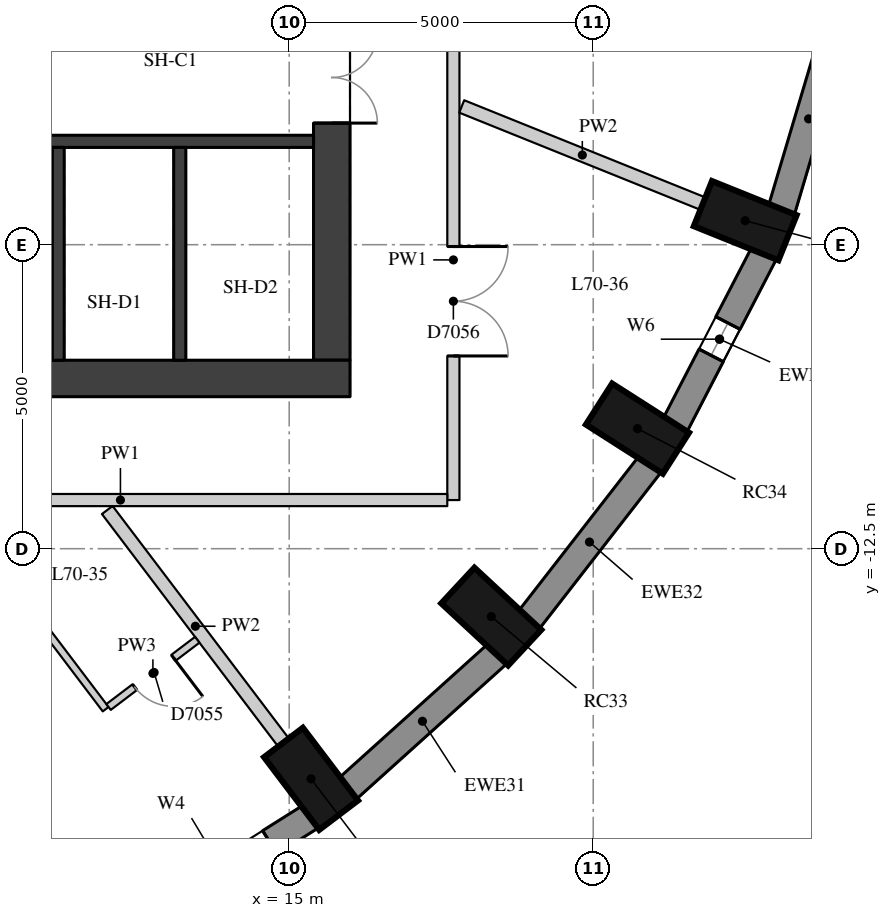
"""IFC4 building model, lengths in metres.
Left out: names, types, materials, properties, quantities, classifications, styles, units other than length and angle.
Written with IfcOpenShell. Run it as: python <this file> out.ifc"""

import sys

from ifc_helpers import new_model, si_unit, direction, frame, frame_2d, origin, origin_2d, place, context, subcontext, project, spatial, rectangle, extrude, element, fill, save


model = new_model("IFC4")
c1 = context("Model", 3, precision=1e-05, world=origin(), true_north=direction((0.0, 1.0)))
c2 = subcontext(c1, "Body", "Model", "MODEL_VIEW")
j1 = project(units=[si_unit("LENGTHUNIT", "METRE"), si_unit("PLANEANGLEUNIT", "RADIAN")], contexts=[c1])
p1 = place(None, origin())
s1 = spatial("IfcSite", under=j1, at=p1, CompositionType="ELEMENT")
p2 = place(p1, origin())
s2 = spatial("IfcBuilding", under=s1, at=p2, CompositionType="ELEMENT")
p3 = place(p2, frame((0.0, 0.0, 246.5)))
s3 = spatial("IfcBuildingStorey", under=s2, at=p3, CompositionType="ELEMENT", Elevation=246.5)
for number, where, z_axis, x_axis in (
    (1, (15.359, -16.285, 0.0), (0.0, 0.0, 1.0), (0.604, -0.797, 0.0)),
    (2, (18.323, -13.616, 0.0), (0.0, 0.0, 1.0), (0.733, -0.681, 0.0)),
    (3, (20.728, -10.525, 0.0), (0.0, 0.0, 1.0), (0.843, -0.539, 0.0)),
    (4, (22.5, -7.105, 0.0), (0.0, 0.0, 1.0), (0.928, -0.374, 0.0)),
):
    element("IfcColumn", number, at=place(p3, frame(where, z_axis=z_axis, x_axis=x_axis)), inside=s3, PredefinedType="COLUMN", context=c2, shape_type="SweptSolid", body=[
        extrude(rectangle(XDim=1.5, YDim=0.8, at=origin_2d()), origin(), (0.0, 0.0, 1.0), 3.3),
    ])
p4 = place(p3, frame((12.49, -18.711, 0.0), z_axis=(0.0, 0.0, 1.0), x_axis=(0.845929139811, 0.53329531258, 0.0)))
e5 = element("IfcWall", 5, at=p4, inside=s3, PredefinedType="SOLIDWALL", context=c2, shape_type="SweptSolid", body=[
    extrude(rectangle(XDim=3.385, YDim=0.45, at=frame_2d((1.692, 0.0))), origin(), (0.0, 0.0, 1.0), 3.02),
])
p5 = place(p4, frame((0.792, 0.0, 0.4)))
e6 = element("IfcOpeningElement", 6, at=p5, cuts=e5, PredefinedType="OPENING", context=c2, shape_type="SweptSolid", body=[
    extrude(rectangle(XDim=1.8, YDim=1.75, at=frame_2d((0.9, 0.875))), frame((0.0, 0.235, 0.0), z_axis=(0.0, -1.0, 0.0), x_axis=(1.0, 0.0, 0.0)), (0.0, 0.0, 1.0), 0.47),
])
p6 = place(p3, frame((15.959, -16.448, 0.0), z_axis=(0.0, 0.0, 1.0), x_axis=(0.743166014219, 0.669107073128, 0.0)))
e7 = element("IfcWall", 7, at=p6, inside=s3, PredefinedType="SOLIDWALL", context=c2, shape_type="SweptSolid", body=[
    extrude(rectangle(XDim=3.316, YDim=0.45, at=frame_2d((1.658, 0.0))), origin(), (0.0, 0.0, 1.0), 3.02),
])
p7 = place(p3, frame((18.942, -13.672, 0.0), z_axis=(0.0, 0.0, 1.0), x_axis=(0.613898970825, 0.789384604372, 0.0)))
e8 = element("IfcWall", 8, at=p7, inside=s3, PredefinedType="SOLIDWALL", context=c2, shape_type="SweptSolid", body=[
    extrude(rectangle(XDim=3.247, YDim=0.45, at=frame_2d((1.624, 0.0))), origin(), (0.0, 0.0, 1.0), 3.02),
])
p8 = place(p3, frame((21.345, -10.468, 0.0), z_axis=(0.0, 0.0, 1.0), x_axis=(0.459921155255, 0.887959757505, 0.0)))
e9 = element("IfcWall", 9, at=p8, inside=s3, PredefinedType="SOLIDWALL", context=c2, shape_type="SweptSolid", body=[
    extrude(rectangle(XDim=3.186, YDim=0.45, at=frame_2d((1.593, 0.0))), origin(), (0.0, 0.0, 1.0), 3.02),
])
p9 = place(p8, frame((1.293, 0.0, 0.4)))
e10 = element("IfcOpeningElement", 10, at=p9, cuts=e9, PredefinedType="OPENING", context=c2, shape_type="SweptSolid", body=[
    extrude(rectangle(XDim=0.6, YDim=1.75, at=frame_2d((0.3, 0.875))), frame((0.0, 0.235, 0.0), z_axis=(0.0, -1.0, 0.0), x_axis=(1.0, 0.0, 0.0)), (0.0, 0.0, 1.0), 0.47),
])
p10 = place(p3, frame((23.094, -6.935, 0.0), z_axis=(0.0, 0.0, 1.0), x_axis=(0.285263800865, 0.958449040855, 0.0)))
e11 = element("IfcWall", 11, at=p10, inside=s3, PredefinedType="SOLIDWALL", context=c2, shape_type="SweptSolid", body=[
    extrude(rectangle(XDim=3.139, YDim=0.45, at=frame_2d((1.57, 0.0))), origin(), (0.0, 0.0, 1.0), 3.02),
])
p11 = place(p3, frame((15.7, -9.4, 0.0), z_axis=(0.0, 0.0, 1.0), x_axis=(0.0, 1.0, 0.0)))
e12 = element("IfcWall", 12, at=p11, inside=s3, PredefinedType="SHEAR", context=c2, shape_type="SweptSolid", body=[
    extrude(rectangle(XDim=18.8, YDim=0.6, at=frame_2d((9.4, 0.0))), origin(), (0.0, 0.0, 1.0), 3.02),
])
p12 = place(p11, frame((13.4, 0.0, 0.0)))
e13 = element("IfcOpeningElement", 13, at=p12, cuts=e12, PredefinedType="OPENING", context=c2, shape_type="SweptSolid", body=[
    extrude(rectangle(XDim=1.5, YDim=2.1, at=frame_2d((0.75, 1.05))), frame((0.0, 0.31, 0.0), z_axis=(0.0, -1.0, 0.0), x_axis=(1.0, 0.0, 0.0)), (0.0, 0.0, 1.0), 0.62),
])
p13 = place(p11, frame((3.9, 0.0, 0.0)))
e14 = element("IfcOpeningElement", 14, at=p13, cuts=e12, PredefinedType="OPENING", context=c2, shape_type="SweptSolid", body=[
    extrude(rectangle(XDim=1.5, YDim=2.1, at=frame_2d((0.75, 1.05))), frame((0.0, 0.31, 0.0), z_axis=(0.0, -1.0, 0.0), x_axis=(1.0, 0.0, 0.0)), (0.0, 0.0, 1.0), 0.62),
])
p14 = place(p3, frame((4.0, -9.7, 0.0), z_axis=(0.0, 0.0, 1.0), x_axis=(1.0, 0.0, 0.0)))
e15 = element("IfcWall", 15, at=p14, inside=s3, PredefinedType="SHEAR", context=c2, shape_type="SweptSolid", body=[
    extrude(rectangle(XDim=12.0, YDim=0.6, at=frame_2d((6.0, 0.0))), origin(), (0.0, 0.0, 1.0), 3.02),
])
p15 = place(p3, frame((4.6, -5.8, 0.0), z_axis=(0.0, 0.0, 1.0), x_axis=(1.0, 0.0, 0.0)))
e16 = element("IfcWall", 16, at=p15, inside=s3, PredefinedType="SHEAR", context=c2, shape_type="SweptSolid", body=[
    extrude(rectangle(XDim=10.8, YDim=0.2, at=frame_2d((5.4, 0.0))), origin(), (0.0, 0.0, 1.0), 3.02),
])
for number, where, z_axis, x_axis in (
    (17, (11.2, -9.4, 0.0), (0.0, 0.0, 1.0), (0.0, 1.0, 0.0)),
    (18, (13.2, -9.4, 0.0), (0.0, 0.0, 1.0), (0.0, 1.0, 0.0)),
):
    element("IfcWall", number, at=place(p3, frame(where, z_axis=z_axis, x_axis=x_axis)), inside=s3, PredefinedType="SHEAR", context=c2, shape_type="SweptSolid", body=[
        extrude(rectangle(XDim=3.5, YDim=0.2, at=frame_2d((1.75, 0.0))), origin(), (0.0, 0.0, 1.0), 3.02),
    ])
p16 = place(p3, frame((6.22, -9.25, 0.0), z_axis=(0.0, 0.0, 1.0), x_axis=(1.0, 0.0, 0.0)))
e19 = element("IfcWall", 19, at=p16, inside=s3, PredefinedType="PARTITIONING", context=c2, shape_type="SweptSolid", body=[
    extrude(rectangle(XDim=4.88, YDim=0.3, at=frame_2d((2.44, 0.0))), origin(), (0.0, 0.0, 1.0), 3.02),
])
p17 = place(p3, frame((17.7, -3.8, 0.0), z_axis=(0.0, 0.0, 1.0), x_axis=(0.0, -1.0, 0.0)))
e20 = element("IfcWall", 20, at=p17, inside=s3, PredefinedType="PARTITIONING", context=c2, shape_type="SweptSolid", body=[
    extrude(rectangle(XDim=7.9, YDim=0.2, at=frame_2d((3.95, 0.0))), origin(), (0.0, 0.0, 1.0), 3.02),
])
p18 = place(p17, frame((3.73, 0.0, 0.0)))
e21 = element("IfcOpeningElement", 21, at=p18, cuts=e20, PredefinedType="OPENING", context=c2, shape_type="SweptSolid", body=[
    extrude(rectangle(XDim=1.8, YDim=2.1, at=frame_2d((0.9, 1.05))), frame((0.0, 0.11, 0.0), z_axis=(0.0, -1.0, 0.0), x_axis=(1.0, 0.0, 0.0)), (0.0, 0.0, 1.0), 0.22),
])
p19 = place(p3, frame((17.6, -11.7, 0.0), z_axis=(0.0, 0.0, 1.0), x_axis=(-1.0, 0.0, 0.0)))
e22 = element("IfcWall", 22, at=p19, inside=s3, PredefinedType="PARTITIONING", context=c2, shape_type="SweptSolid", body=[
    extrude(rectangle(XDim=10.751, YDim=0.2, at=frame_2d((5.375, 0.0))), origin(), (0.0, 0.0, 1.0), 3.02),
])
p20 = place(p19, frame((8.493, 0.0, 0.0)))
e23 = element("IfcOpeningElement", 23, at=p20, cuts=e22, PredefinedType="OPENING", context=c2, shape_type="SweptSolid", body=[
    extrude(rectangle(XDim=1.1, YDim=2.1, at=frame_2d((0.55, 1.05))), frame((0.0, 0.11, 0.0), z_axis=(0.0, -1.0, 0.0), x_axis=(1.0, 0.0, 0.0)), (0.0, 0.0, 1.0), 0.22),
])
p21 = place(p3, frame((14.906, -15.687, 0.0), z_axis=(0.0, 0.0, 1.0), x_axis=(-0.604046750172, 0.796948883936, 0.0)))
e24 = element("IfcWall", 24, at=p21, inside=s3, PredefinedType="PARTITIONING", context=c2, shape_type="SweptSolid", body=[
    extrude(rectangle(XDim=4.798, YDim=0.22, at=frame_2d((2.399, 0.0))), origin(), (0.0, 0.0, 1.0), 3.02),
])
p22 = place(p3, frame((21.804, -6.824, 0.0), z_axis=(0.0, 0.0, 1.0), x_axis=(-0.92753277681, 0.373741819902, 0.0)))
e25 = element("IfcWall", 25, at=p22, inside=s3, PredefinedType="PARTITIONING", context=c2, shape_type="SweptSolid", body=[
    extrude(rectangle(XDim=4.277, YDim=0.22, at=frame_2d((2.138, 0.0))), origin(), (0.0, 0.0, 1.0), 3.02),
])
p23 = place(p3, frame((9.474, -11.832, 0.0), z_axis=(0.0, 0.0, 1.0), x_axis=(0.604029811985, -0.796961721938, 0.0)))
e26 = element("IfcWall", 26, at=p23, inside=s3, PredefinedType="PARTITIONING", context=c2, shape_type="SweptSolid", body=[
    extrude(rectangle(XDim=4.151, YDim=0.12, at=frame_2d((2.075, 0.0))), origin(), (0.0, 0.0, 1.0), 3.02),
])
p24 = place(p3, frame((12.029, -15.104, 0.0), z_axis=(0.0, 0.0, 1.0), x_axis=(0.796883918959, 0.60413245212, 0.0)))
e27 = element("IfcWall", 27, at=p24, inside=s3, PredefinedType="PARTITIONING", context=c2, shape_type="SweptSolid", body=[
    extrude(rectangle(XDim=1.83, YDim=0.12, at=frame_2d((0.915, 0.0))), origin(), (0.0, 0.0, 1.0), 3.02),
])
p25 = place(p24, frame((0.54, 0.0, 0.0)))
e28 = element("IfcOpeningElement", 28, at=p25, cuts=e27, PredefinedType="OPENING", context=c2, shape_type="SweptSolid", body=[
    extrude(rectangle(XDim=0.8, YDim=2.1, at=frame_2d((0.4, 1.05))), frame((0.0, 0.07, 0.0), z_axis=(0.0, -1.0, 0.0), x_axis=(1.0, 0.0, 0.0)), (0.0, 0.0, 1.0), 0.14),
])
p26 = place(p9, origin())
e29 = element("IfcWindow", 29, at=p26, inside=s3, PartitioningType="SINGLE_PANEL", PredefinedType="WINDOW", context=c2, shape_type="SweptSolid", body=[
    extrude(rectangle(XDim=0.6, YDim=1.75, at=frame_2d((0.3, 0.875))), frame((0.0, 0.035, 0.0), z_axis=(0.0, -1.0, 0.0), x_axis=(1.0, 0.0, 0.0)), (0.0, 0.0, 1.0), 0.06),
])
fill(e10, e29)
p27 = place(p13, origin())
e30 = element("IfcDoor", 30, at=p27, inside=s3, OperationType="DOUBLE_DOOR_SINGLE_SWING", PredefinedType="DOOR", context=c2, shape_type="SweptSolid", body=[
    extrude(rectangle(XDim=1.5, YDim=2.1, at=frame_2d((0.75, 1.05))), frame((0.0, 0.025, 0.0), z_axis=(0.0, -1.0, 0.0), x_axis=(1.0, 0.0, 0.0)), (0.0, 0.0, 1.0), 0.05),
])
fill(e14, e30)
p28 = place(p25, origin())
e31 = element("IfcDoor", 31, at=p28, inside=s3, OperationType="SINGLE_SWING_LEFT", PredefinedType="DOOR", context=c2, shape_type="SweptSolid", body=[
    extrude(rectangle(XDim=0.8, YDim=2.1, at=frame_2d((0.4, 1.05))), frame((0.0, 0.025, 0.0), z_axis=(0.0, -1.0, 0.0), x_axis=(1.0, 0.0, 0.0)), (0.0, 0.0, 1.0), 0.05),
])
fill(e28, e31)
p29 = place(p18, origin())
e32 = element("IfcDoor", 32, at=p29, inside=s3, OperationType="DOUBLE_DOOR_SINGLE_SWING", PredefinedType="DOOR", context=c2, shape_type="SweptSolid", body=[
    extrude(rectangle(XDim=1.8, YDim=2.1, at=frame_2d((0.9, 1.05))), frame((0.0, 0.025, 0.0), z_axis=(0.0, -1.0, 0.0), x_axis=(1.0, 0.0, 0.0)), (0.0, 0.0, 1.0), 0.05),
])
fill(e21, e32)
save(model, sys.argv[1])
